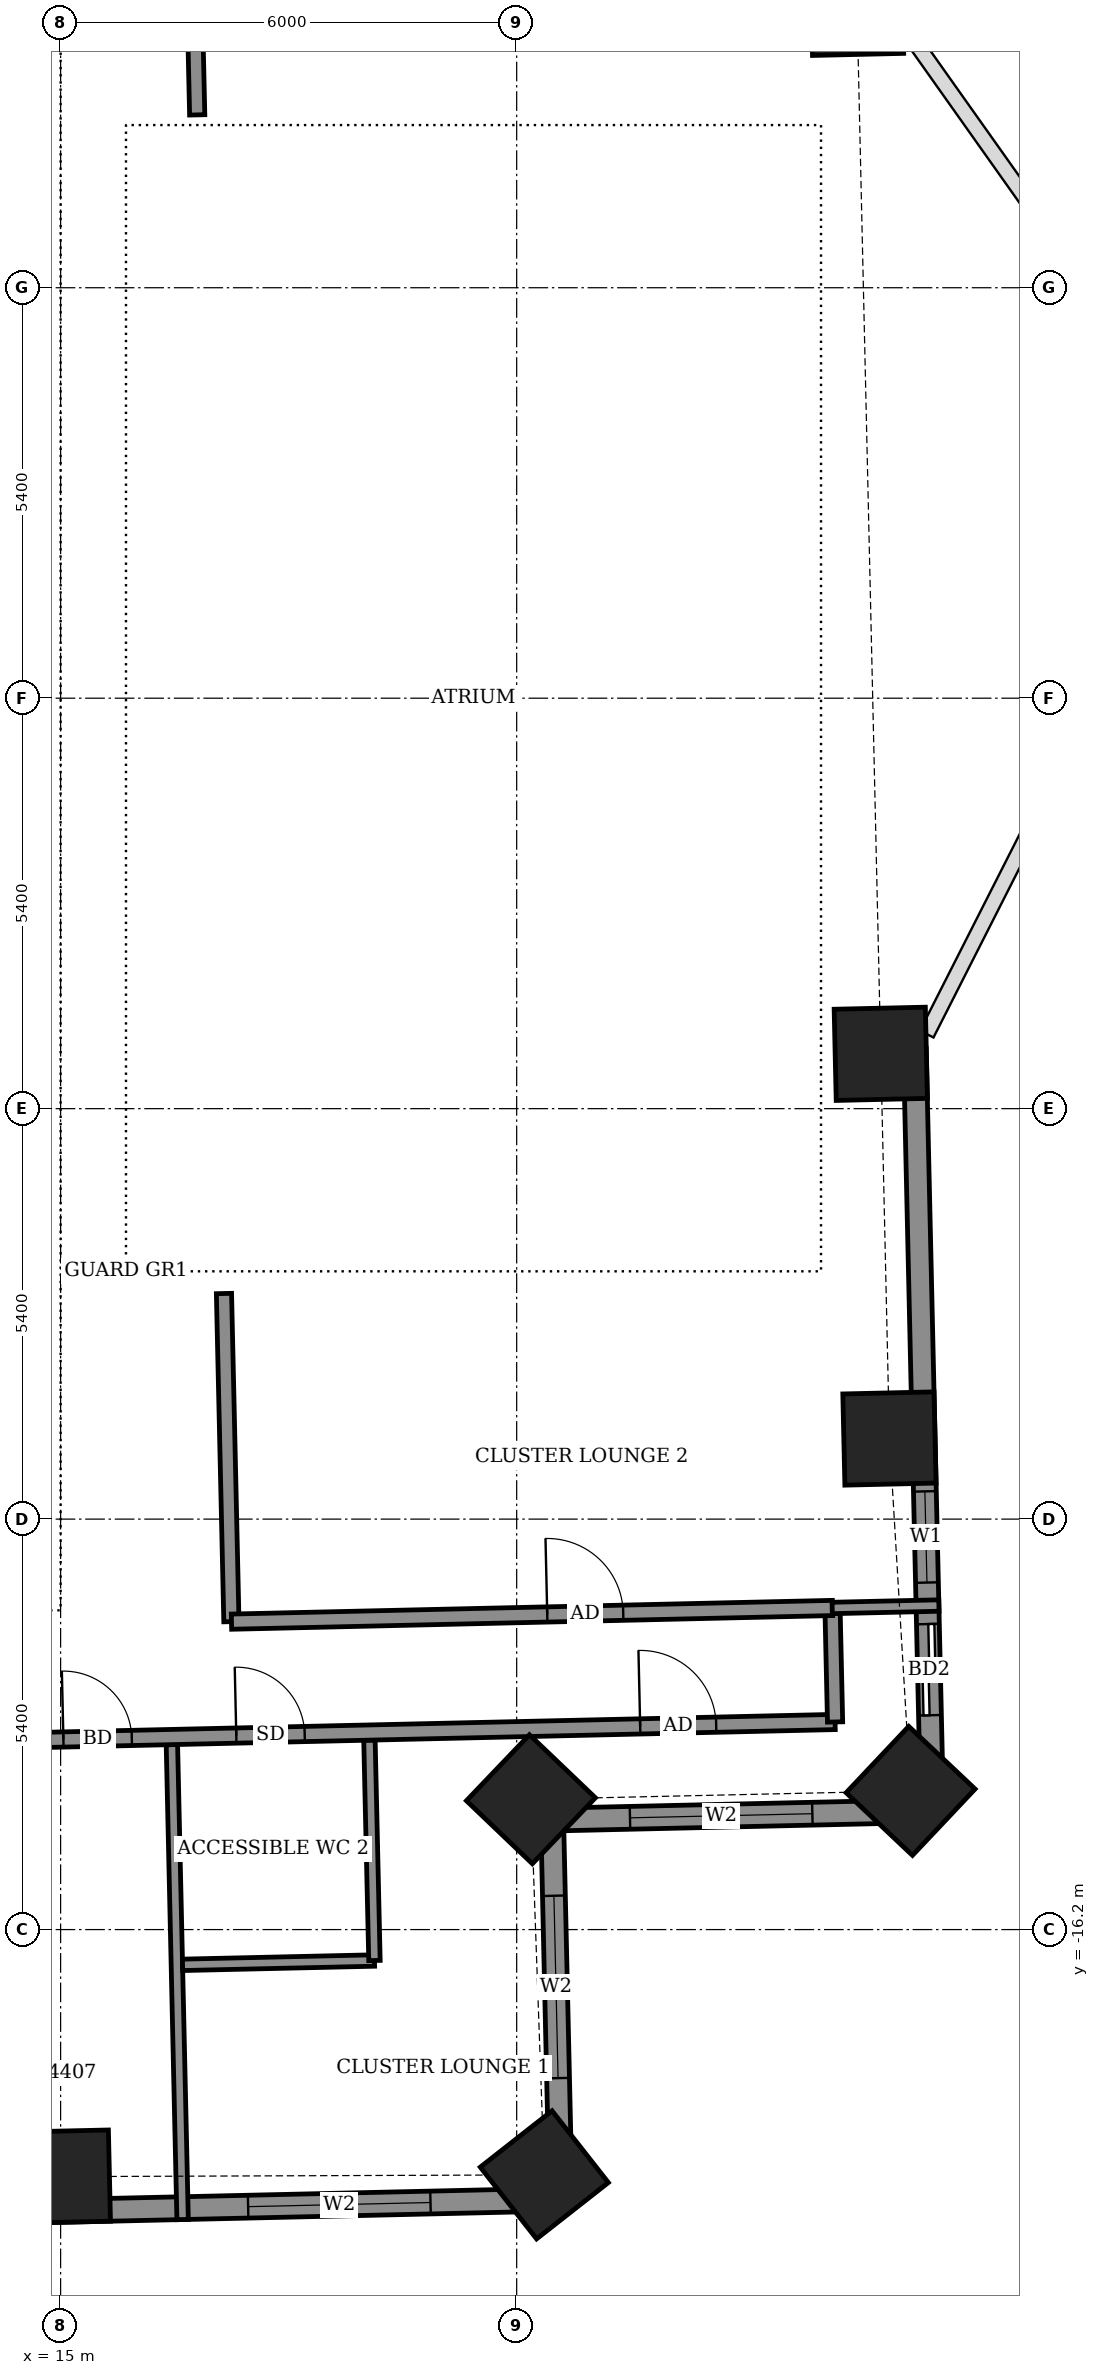
"""IFC4 building model, lengths in metres.
Left out: names, types, materials, properties, quantities, classifications, styles, units other than length and angle.
Written with IfcOpenShell. Run it as: python <this file> out.ifc"""

import sys

from ifc_helpers import new_model, si_unit, direction, frame, frame_2d, origin, origin_2d, place, context, subcontext, project, spatial, rectangle, extrude, element, fill, save


model = new_model("IFC4")
c1 = context("Model", 3, precision=1e-05, world=origin(), true_north=direction((0.0, 1.0)))
c2 = subcontext(c1, "Body", "Model", "MODEL_VIEW")
j1 = project(units=[si_unit("LENGTHUNIT", "METRE"), si_unit("PLANEANGLEUNIT", "RADIAN")], contexts=[c1])
p1 = place(None, origin())
s1 = spatial("IfcSite", under=j1, at=p1, CompositionType="ELEMENT")
p2 = place(p1, origin())
s2 = spatial("IfcBuilding", under=s1, at=p2, CompositionType="ELEMENT")
p3 = place(p2, frame((0.0, 0.0, 175.3)))
s3 = spatial("IfcBuildingStorey", under=s2, at=p3, CompositionType="ELEMENT", Elevation=175.3)
for number, where, z_axis, x_axis in (
    (1, (15.042, -19.45, -0.55), (0.0, 0.0, 1.0), (1.0, 0.023, 0.0)),
    (2, (21.364, -19.427, -0.55), (0.0, 0.0, 1.0), (0.787, 0.617, 0.0)),
    (3, (21.187, -14.486, -0.55), (0.0, 0.0, 1.0), (0.691, 0.723, 0.0)),
    (4, (26.183, -14.375, -0.55), (0.0, 0.0, 1.0), (0.686, 0.727, 0.0)),
    (5, (25.904, -9.74, -0.55), (0.0, 0.0, 1.0), (-0.023, 1.0, 0.0)),
    (6, (25.79, -4.678, -0.55), (0.0, 0.0, 1.0), (-0.023, 1.0, 0.0)),
    (7, (25.478, 9.069, -0.55), (0.0, 0.0, 1.0), (-0.023, 1.0, 0.0)),
):
    element("IfcColumn", number, at=place(p3, frame(where, z_axis=z_axis, x_axis=x_axis)), inside=s3, PredefinedType="COLUMN", context=c2, shape_type="SweptSolid", body=[
        extrude(rectangle(XDim=1.2, YDim=1.2, at=origin_2d()), origin(), (0.0, 0.0, 1.0), 3.6),
    ])
p4 = place(p3, frame((26.466, -14.64, 0.0), z_axis=(0.0, 0.0, 1.0), x_axis=(-0.022735782058, 0.999741508698, 0.0)))
e8 = element("IfcWall", 8, at=p4, inside=s3, PredefinedType="SOLIDWALL", context=c2, shape_type="SweptSolid", body=[
    extrude(rectangle(XDim=10.03, YDim=0.3, at=frame_2d((5.015, 0.0))), origin(), (0.0, 0.0, 1.0), 2.55),
])
p5 = place(p4, frame((1.26, 0.0, 0.0)))
e9 = element("IfcOpeningElement", 9, at=p5, cuts=e8, PredefinedType="OPENING", context=c2, shape_type="SweptSolid", body=[
    extrude(rectangle(XDim=1.2, YDim=2.4, at=frame_2d((0.6, 1.2))), frame((0.0, 0.16, 0.0), z_axis=(0.0, -1.0, 0.0), x_axis=(1.0, 0.0, 0.0)), (0.0, 0.0, 1.0), 0.32),
])
p6 = place(p4, frame((3.006, 0.0, 0.9)))
e10 = element("IfcOpeningElement", 10, at=p6, cuts=e8, PredefinedType="OPENING", context=c2, shape_type="SweptSolid", body=[
    extrude(rectangle(XDim=1.2, YDim=1.5, at=frame_2d((0.6, 0.75))), frame((0.0, 0.16, 0.0), z_axis=(0.0, -1.0, 0.0), x_axis=(1.0, 0.0, 0.0)), (0.0, 0.0, 1.0), 0.32),
])
p7 = place(p3, frame((-18.189, -20.655, 0.0), z_axis=(0.0, 0.0, 1.0), x_axis=(0.999742285265, 0.022701609063, 0.0)))
e11 = element("IfcWall", 11, at=p7, inside=s3, PredefinedType="SOLIDWALL", context=c2, shape_type="SweptSolid", body=[
    extrude(rectangle(XDim=39.78, YDim=0.3, at=frame_2d((19.89, 0.0))), origin(), (0.0, 0.0, 1.0), 3.05),
])
p8 = place(p7, frame((1.973, 0.0, 0.0)))
e12 = element("IfcOpeningElement", 12, at=p8, cuts=e11, PredefinedType="OPENING", context=c2, shape_type="SweptSolid", body=[
    extrude(rectangle(XDim=1.5, YDim=2.4, at=frame_2d((0.75, 1.2))), frame((0.0, 0.16, 0.0), z_axis=(0.0, -1.0, 0.0), x_axis=(1.0, 0.0, 0.0)), (0.0, 0.0, 1.0), 0.32),
])
p9 = place(p7, frame((7.24, 0.0, 0.0)))
e13 = element("IfcOpeningElement", 13, at=p9, cuts=e11, PredefinedType="OPENING", context=c2, shape_type="SweptSolid", body=[
    extrude(rectangle(XDim=1.5, YDim=2.4, at=frame_2d((0.75, 1.2))), frame((0.0, 0.16, 0.0), z_axis=(0.0, -1.0, 0.0), x_axis=(1.0, 0.0, 0.0)), (0.0, 0.0, 1.0), 0.32),
])
p10 = place(p7, frame((10.23, 0.0, 0.0)))
e14 = element("IfcOpeningElement", 14, at=p10, cuts=e11, PredefinedType="OPENING", context=c2, shape_type="SweptSolid", body=[
    extrude(rectangle(XDim=1.5, YDim=2.4, at=frame_2d((0.75, 1.2))), frame((0.0, 0.16, 0.0), z_axis=(0.0, -1.0, 0.0), x_axis=(1.0, 0.0, 0.0)), (0.0, 0.0, 1.0), 0.32),
])
p11 = place(p7, frame((14.83, 0.0, 0.0)))
e15 = element("IfcOpeningElement", 15, at=p11, cuts=e11, PredefinedType="OPENING", context=c2, shape_type="SweptSolid", body=[
    extrude(rectangle(XDim=1.5, YDim=2.4, at=frame_2d((0.75, 1.2))), frame((0.0, 0.16, 0.0), z_axis=(0.0, -1.0, 0.0), x_axis=(1.0, 0.0, 0.0)), (0.0, 0.0, 1.0), 0.32),
])
p12 = place(p7, frame((17.97, 0.0, 0.0)))
e16 = element("IfcOpeningElement", 16, at=p12, cuts=e11, PredefinedType="OPENING", context=c2, shape_type="SweptSolid", body=[
    extrude(rectangle(XDim=1.2, YDim=2.4, at=frame_2d((0.6, 1.2))), frame((0.0, 0.16, 0.0), z_axis=(0.0, -1.0, 0.0), x_axis=(1.0, 0.0, 0.0)), (0.0, 0.0, 1.0), 0.32),
])
p13 = place(p7, frame((23.275, 0.0, 0.0)))
e17 = element("IfcOpeningElement", 17, at=p13, cuts=e11, PredefinedType="OPENING", context=c2, shape_type="SweptSolid", body=[
    extrude(rectangle(XDim=1.5, YDim=2.4, at=frame_2d((0.75, 1.2))), frame((0.0, 0.16, 0.0), z_axis=(0.0, -1.0, 0.0), x_axis=(1.0, 0.0, 0.0)), (0.0, 0.0, 1.0), 0.32),
])
p14 = place(p7, frame((27.935, 0.0, 0.0)))
e18 = element("IfcOpeningElement", 18, at=p14, cuts=e11, PredefinedType="OPENING", context=c2, shape_type="SweptSolid", body=[
    extrude(rectangle(XDim=1.5, YDim=2.4, at=frame_2d((0.75, 1.2))), frame((0.0, 0.16, 0.0), z_axis=(0.0, -1.0, 0.0), x_axis=(1.0, 0.0, 0.0)), (0.0, 0.0, 1.0), 0.32),
])
p15 = place(p7, frame((30.925, 0.0, 0.0)))
e19 = element("IfcOpeningElement", 19, at=p15, cuts=e11, PredefinedType="OPENING", context=c2, shape_type="SweptSolid", body=[
    extrude(rectangle(XDim=1.5, YDim=2.4, at=frame_2d((0.75, 1.2))), frame((0.0, 0.16, 0.0), z_axis=(0.0, -1.0, 0.0), x_axis=(1.0, 0.0, 0.0)), (0.0, 0.0, 1.0), 0.32),
])
p16 = place(p7, frame((35.665, 0.0, 0.9)))
e20 = element("IfcOpeningElement", 20, at=p16, cuts=e11, PredefinedType="OPENING", context=c2, shape_type="SweptSolid", body=[
    extrude(rectangle(XDim=2.4, YDim=1.5, at=frame_2d((1.2, 0.75))), frame((0.0, 0.16, 0.0), z_axis=(0.0, -1.0, 0.0), x_axis=(1.0, 0.0, 0.0)), (0.0, 0.0, 1.0), 0.32),
])
p17 = place(p3, frame((21.581, -19.752, 0.0), z_axis=(0.0, 0.0, 1.0), x_axis=(-0.022801259434, 0.999740017489, 0.0)))
e21 = element("IfcWall", 21, at=p17, inside=s3, PredefinedType="SOLIDWALL", context=c2, shape_type="SweptSolid", body=[
    extrude(rectangle(XDim=5.0, YDim=0.3, at=frame_2d((2.5, 0.0))), origin(), (0.0, 0.0, 1.0), 2.55),
])
p18 = place(p17, frame((1.598, 0.0, 0.9)))
e22 = element("IfcOpeningElement", 22, at=p18, cuts=e21, PredefinedType="OPENING", context=c2, shape_type="SweptSolid", body=[
    extrude(rectangle(XDim=2.4, YDim=1.5, at=frame_2d((1.2, 0.75))), frame((0.0, 0.16, 0.0), z_axis=(0.0, -1.0, 0.0), x_axis=(1.0, 0.0, 0.0)), (0.0, 0.0, 1.0), 0.32),
])
p19 = place(p3, frame((21.467, -14.753, 0.0), z_axis=(0.0, 0.0, 1.0), x_axis=(0.999744450377, 0.022606059803, 0.0)))
e23 = element("IfcWall", 23, at=p19, inside=s3, PredefinedType="SOLIDWALL", context=c2, shape_type="SweptSolid", body=[
    extrude(rectangle(XDim=5.0, YDim=0.3, at=frame_2d((2.5, 0.0))), origin(), (0.0, 0.0, 1.0), 2.55),
])
p20 = place(p19, frame((1.024, 0.0, 0.9)))
e24 = element("IfcOpeningElement", 24, at=p20, cuts=e23, PredefinedType="OPENING", context=c2, shape_type="SweptSolid", body=[
    extrude(rectangle(XDim=2.4, YDim=1.5, at=frame_2d((1.2, 0.75))), frame((0.0, 0.16, 0.0), z_axis=(0.0, -1.0, 0.0), x_axis=(1.0, 0.0, 0.0)), (0.0, 0.0, 1.0), 0.32),
])
p21 = place(p3, frame((16.605, -20.015, 0.0), z_axis=(0.0, 0.0, 1.0), x_axis=(-0.022541260291, 0.999745913512, 0.0)))
e25 = element("IfcWall", 25, at=p21, inside=s3, PredefinedType="PARTITIONING", context=c2, shape_type="SweptSolid", body=[
    extrude(rectangle(XDim=6.25, YDim=0.15, at=frame_2d((3.125, 0.0))), origin(), (0.0, 0.0, 1.0), 2.55),
])
p22 = place(p3, frame((16.604, -16.664, 0.0), z_axis=(0.0, 0.0, 1.0), x_axis=(0.999744126128, 0.022620395041, 0.0)))
e26 = element("IfcWall", 26, at=p22, inside=s3, PredefinedType="PARTITIONING", context=c2, shape_type="SweptSolid", body=[
    extrude(rectangle(XDim=2.526, YDim=0.15, at=frame_2d((1.263, 0.0))), origin(), (0.0, 0.0, 1.0), 3.05),
])
p23 = place(p3, frame((19.129, -16.607, 0.0), z_axis=(0.0, 0.0, 1.0), x_axis=(-0.022732880677, 0.999741574676, 0.0)))
e27 = element("IfcWall", 27, at=p23, inside=s3, PredefinedType="PARTITIONING", context=c2, shape_type="SweptSolid", body=[
    extrude(rectangle(XDim=2.9, YDim=0.15, at=frame_2d((1.45, 0.0))), origin(), (0.0, 0.0, 1.0), 3.05),
])
p24 = place(p3, frame((-21.279, -14.523, 0.0), z_axis=(0.0, 0.0, 1.0), x_axis=(0.999742878501, 0.022675468818, 0.0)))
e28 = element("IfcWall", 28, at=p24, inside=s3, PredefinedType="PARTITIONING", context=c2, shape_type="SweptSolid", body=[
    extrude(rectangle(XDim=46.48, YDim=0.2, at=frame_2d((23.24, 0.0))), origin(), (0.0, 0.0, 1.0), 3.05),
])
p25 = place(p24, frame((1.325, 0.0, 0.0)))
e29 = element("IfcOpeningElement", 29, at=p25, cuts=e28, PredefinedType="OPENING", context=c2, shape_type="SweptSolid", body=[
    extrude(rectangle(XDim=1.0, YDim=2.1, at=frame_2d((0.5, 1.05))), frame((0.0, 0.11, 0.0), z_axis=(0.0, -1.0, 0.0), x_axis=(1.0, 0.0, 0.0)), (0.0, 0.0, 1.0), 0.22),
])
p26 = place(p24, frame((5.9, 0.0, 0.0)))
e30 = element("IfcOpeningElement", 30, at=p26, cuts=e28, PredefinedType="OPENING", context=c2, shape_type="SweptSolid", body=[
    extrude(rectangle(XDim=0.9, YDim=2.1, at=frame_2d((0.45, 1.05))), frame((0.0, 0.11, 0.0), z_axis=(0.0, -1.0, 0.0), x_axis=(1.0, 0.0, 0.0)), (0.0, 0.0, 1.0), 0.22),
])
p27 = place(p24, frame((10.6, 0.0, 0.0)))
e31 = element("IfcOpeningElement", 31, at=p27, cuts=e28, PredefinedType="OPENING", context=c2, shape_type="SweptSolid", body=[
    extrude(rectangle(XDim=0.9, YDim=2.1, at=frame_2d((0.45, 1.05))), frame((0.0, 0.11, 0.0), z_axis=(0.0, -1.0, 0.0), x_axis=(1.0, 0.0, 0.0)), (0.0, 0.0, 1.0), 0.22),
])
p28 = place(p24, frame((12.525, 0.0, 0.0)))
e32 = element("IfcOpeningElement", 32, at=p28, cuts=e28, PredefinedType="OPENING", context=c2, shape_type="SweptSolid", body=[
    extrude(rectangle(XDim=0.9, YDim=2.1, at=frame_2d((0.45, 1.05))), frame((0.0, 0.11, 0.0), z_axis=(0.0, -1.0, 0.0), x_axis=(1.0, 0.0, 0.0)), (0.0, 0.0, 1.0), 0.22),
])
p29 = place(p24, frame((19.175, 0.0, 0.0)))
e33 = element("IfcOpeningElement", 33, at=p29, cuts=e28, PredefinedType="OPENING", context=c2, shape_type="SweptSolid", body=[
    extrude(rectangle(XDim=0.9, YDim=2.1, at=frame_2d((0.45, 1.05))), frame((0.0, 0.11, 0.0), z_axis=(0.0, -1.0, 0.0), x_axis=(1.0, 0.0, 0.0)), (0.0, 0.0, 1.0), 0.22),
])
p30 = place(p24, frame((21.05, 0.0, 0.0)))
e34 = element("IfcOpeningElement", 34, at=p30, cuts=e28, PredefinedType="OPENING", context=c2, shape_type="SweptSolid", body=[
    extrude(rectangle(XDim=0.9, YDim=2.1, at=frame_2d((0.45, 1.05))), frame((0.0, 0.11, 0.0), z_axis=(0.0, -1.0, 0.0), x_axis=(1.0, 0.0, 0.0)), (0.0, 0.0, 1.0), 0.22),
])
p31 = place(p24, frame((27.725, 0.0, 0.0)))
e35 = element("IfcOpeningElement", 35, at=p31, cuts=e28, PredefinedType="OPENING", context=c2, shape_type="SweptSolid", body=[
    extrude(rectangle(XDim=0.9, YDim=2.1, at=frame_2d((0.45, 1.05))), frame((0.0, 0.11, 0.0), z_axis=(0.0, -1.0, 0.0), x_axis=(1.0, 0.0, 0.0)), (0.0, 0.0, 1.0), 0.22),
])
p32 = place(p24, frame((29.6, 0.0, 0.0)))
e36 = element("IfcOpeningElement", 36, at=p32, cuts=e28, PredefinedType="OPENING", context=c2, shape_type="SweptSolid", body=[
    extrude(rectangle(XDim=0.9, YDim=2.1, at=frame_2d((0.45, 1.05))), frame((0.0, 0.11, 0.0), z_axis=(0.0, -1.0, 0.0), x_axis=(1.0, 0.0, 0.0)), (0.0, 0.0, 1.0), 0.22),
])
p33 = place(p24, frame((36.325, 0.0, 0.0)))
e37 = element("IfcOpeningElement", 37, at=p33, cuts=e28, PredefinedType="OPENING", context=c2, shape_type="SweptSolid", body=[
    extrude(rectangle(XDim=0.9, YDim=2.1, at=frame_2d((0.45, 1.05))), frame((0.0, 0.11, 0.0), z_axis=(0.0, -1.0, 0.0), x_axis=(1.0, 0.0, 0.0)), (0.0, 0.0, 1.0), 0.22),
])
p34 = place(p24, frame((43.915, 0.0, 0.0)))
e38 = element("IfcOpeningElement", 38, at=p34, cuts=e28, PredefinedType="OPENING", context=c2, shape_type="SweptSolid", body=[
    extrude(rectangle(XDim=1.0, YDim=2.1, at=frame_2d((0.5, 1.05))), frame((0.0, 0.11, 0.0), z_axis=(0.0, -1.0, 0.0), x_axis=(1.0, 0.0, 0.0)), (0.0, 0.0, 1.0), 0.22),
])
p35 = place(p24, frame((38.6, 0.0, 0.0)))
e39 = element("IfcOpeningElement", 39, at=p35, cuts=e28, PredefinedType="OPENING", context=c2, shape_type="SweptSolid", body=[
    extrude(rectangle(XDim=0.9, YDim=2.1, at=frame_2d((0.45, 1.05))), frame((0.0, 0.11, 0.0), z_axis=(0.0, -1.0, 0.0), x_axis=(1.0, 0.0, 0.0)), (0.0, 0.0, 1.0), 0.22),
])
p36 = place(p3, frame((25.189, -13.469, 0.0), z_axis=(0.0, 0.0, 1.0), x_axis=(-0.022617910375, 0.999744182344, 0.0)))
e40 = element("IfcWall", 40, at=p36, inside=s3, PredefinedType="PARTITIONING", context=c2, shape_type="SweptSolid", body=[
    extrude(rectangle(XDim=1.5, YDim=0.2, at=frame_2d((0.75, 0.0))), origin(), (0.0, 0.0, 1.0), 3.05),
])
p37 = place(p3, frame((17.247, -12.149, 0.0), z_axis=(0.0, 0.0, 1.0), x_axis=(-0.022729111383, 0.999741660378, 0.0)))
e41 = element("IfcWall", 41, at=p37, inside=s3, PredefinedType="PARTITIONING", context=c2, shape_type="SweptSolid", body=[
    extrude(rectangle(XDim=4.318, YDim=0.2, at=frame_2d((2.159, 0.0))), origin(), (0.0, 0.0, 1.0), 3.05),
])
p38 = place(p3, frame((17.248, -12.149, 0.0), z_axis=(0.0, 0.0, 1.0), x_axis=(0.999741181744, 0.022750154412, 0.0)))
e42 = element("IfcWall", 42, at=p38, inside=s3, PredefinedType="PARTITIONING", context=c2, shape_type="SweptSolid", body=[
    extrude(rectangle(XDim=7.909, YDim=0.2, at=frame_2d((3.955, 0.0))), origin(), (0.0, 0.0, 1.0), 3.05),
])
p39 = place(p38, frame((4.155, 0.0, 0.0)))
e43 = element("IfcOpeningElement", 43, at=p39, cuts=e42, PredefinedType="OPENING", context=c2, shape_type="SweptSolid", body=[
    extrude(rectangle(XDim=1.0, YDim=2.1, at=frame_2d((0.5, 1.05))), frame((0.0, 0.11, 0.0), z_axis=(0.0, -1.0, 0.0), x_axis=(1.0, 0.0, 0.0)), (0.0, 0.0, 1.0), 0.22),
])
p40 = place(p3, frame((25.151, -11.969, 0.0), z_axis=(0.0, 0.0, 1.0), x_axis=(0.999740667531, 0.022772739949, 0.0)))
e44 = element("IfcWall", 44, at=p40, inside=s3, PredefinedType="PARTITIONING", context=c2, shape_type="SweptSolid", body=[
    extrude(rectangle(XDim=1.404, YDim=0.15, at=frame_2d((0.702, 0.0))), origin(), (0.0, 0.0, 1.0), 2.55),
])
p41 = place(p3, frame((16.797, 7.674, 0.0), z_axis=(0.0, 0.0, 1.0), x_axis=(-0.022698399288, 0.999742358145, 0.0)))
e45 = element("IfcWall", 45, at=p41, inside=s3, PredefinedType="PARTITIONING", context=c2, shape_type="SweptSolid", body=[
    extrude(rectangle(XDim=8.196, YDim=0.2, at=frame_2d((4.098, 0.0))), origin(), (0.0, 0.0, 1.0), 3.05),
])
p42 = place(p41, frame((3.683, 0.0, 0.0)))
e46 = element("IfcOpeningElement", 46, at=p42, cuts=e45, PredefinedType="OPENING", context=c2, shape_type="SweptSolid", body=[
    extrude(rectangle(XDim=1.0, YDim=2.1, at=frame_2d((0.5, 1.05))), frame((0.0, 0.11, 0.0), z_axis=(0.0, -1.0, 0.0), x_axis=(1.0, 0.0, 0.0)), (0.0, 0.0, 1.0), 0.22),
])
p43 = place(p5, origin())
e47 = element("IfcDoor", 47, at=p43, inside=s3, OperationType="SLIDING_TO_LEFT", PredefinedType="DOOR", context=c2, shape_type="SweptSolid", body=[
    extrude(rectangle(XDim=1.2, YDim=2.4, at=frame_2d((0.6, 1.2))), frame((0.0, 0.025, 0.0), z_axis=(0.0, -1.0, 0.0), x_axis=(1.0, 0.0, 0.0)), (0.0, 0.0, 1.0), 0.05),
])
fill(e9, e47)
p44 = place(p6, origin())
e48 = element("IfcWindow", 48, at=p44, inside=s3, PartitioningType="SINGLE_PANEL", PredefinedType="WINDOW", context=c2, shape_type="SweptSolid", body=[
    extrude(rectangle(XDim=1.2, YDim=1.5, at=frame_2d((0.6, 0.75))), frame((0.0, 0.03, 0.0), z_axis=(0.0, -1.0, 0.0), x_axis=(1.0, 0.0, 0.0)), (0.0, 0.0, 1.0), 0.06),
])
fill(e10, e48)
p45 = place(p16, origin())
e49 = element("IfcWindow", 49, at=p45, inside=s3, PartitioningType="DOUBLE_PANEL_VERTICAL", PredefinedType="WINDOW", context=c2, shape_type="SweptSolid", body=[
    extrude(rectangle(XDim=2.4, YDim=1.5, at=frame_2d((1.2, 0.75))), frame((0.0, 0.03, 0.0), z_axis=(0.0, -1.0, 0.0), x_axis=(1.0, 0.0, 0.0)), (0.0, 0.0, 1.0), 0.06),
])
fill(e20, e49)
p46 = place(p18, origin())
e50 = element("IfcWindow", 50, at=p46, inside=s3, PartitioningType="DOUBLE_PANEL_VERTICAL", PredefinedType="WINDOW", context=c2, shape_type="SweptSolid", body=[
    extrude(rectangle(XDim=2.4, YDim=1.5, at=frame_2d((1.2, 0.75))), frame((0.0, 0.03, 0.0), z_axis=(0.0, -1.0, 0.0), x_axis=(1.0, 0.0, 0.0)), (0.0, 0.0, 1.0), 0.06),
])
fill(e22, e50)
p47 = place(p20, origin())
e51 = element("IfcWindow", 51, at=p47, inside=s3, PartitioningType="DOUBLE_PANEL_VERTICAL", PredefinedType="WINDOW", context=c2, shape_type="SweptSolid", body=[
    extrude(rectangle(XDim=2.4, YDim=1.5, at=frame_2d((1.2, 0.75))), frame((0.0, 0.03, 0.0), z_axis=(0.0, -1.0, 0.0), x_axis=(1.0, 0.0, 0.0)), (0.0, 0.0, 1.0), 0.06),
])
fill(e24, e51)
p48 = place(p33, origin())
e52 = element("IfcDoor", 52, at=p48, inside=s3, OperationType="SINGLE_SWING_LEFT", PredefinedType="DOOR", context=c2, shape_type="SweptSolid", body=[
    extrude(rectangle(XDim=0.9, YDim=2.1, at=frame_2d((0.45, 1.05))), frame((0.0, 0.025, 0.0), z_axis=(0.0, -1.0, 0.0), x_axis=(1.0, 0.0, 0.0)), (0.0, 0.0, 1.0), 0.05),
])
fill(e37, e52)
p49 = place(p34, origin())
e53 = element("IfcDoor", 53, at=p49, inside=s3, OperationType="SINGLE_SWING_RIGHT", PredefinedType="DOOR", context=c2, shape_type="SweptSolid", body=[
    extrude(rectangle(XDim=1.0, YDim=2.1, at=frame_2d((0.5, 1.05))), frame((0.0, 0.025, 0.0), z_axis=(0.0, -1.0, 0.0), x_axis=(1.0, 0.0, 0.0)), (0.0, 0.0, 1.0), 0.05),
])
fill(e38, e53)
p50 = place(p35, origin())
e54 = element("IfcDoor", 54, at=p50, inside=s3, OperationType="SINGLE_SWING_RIGHT", PredefinedType="DOOR", context=c2, shape_type="SweptSolid", body=[
    extrude(rectangle(XDim=0.9, YDim=2.1, at=frame_2d((0.45, 1.05))), frame((0.0, 0.025, 0.0), z_axis=(0.0, -1.0, 0.0), x_axis=(1.0, 0.0, 0.0)), (0.0, 0.0, 1.0), 0.05),
])
fill(e39, e54)
p51 = place(p39, origin())
e55 = element("IfcDoor", 55, at=p51, inside=s3, OperationType="SINGLE_SWING_LEFT", PredefinedType="DOOR", context=c2, shape_type="SweptSolid", body=[
    extrude(rectangle(XDim=1.0, YDim=2.1, at=frame_2d((0.5, 1.05))), frame((0.0, 0.025, 0.0), z_axis=(0.0, -1.0, 0.0), x_axis=(1.0, 0.0, 0.0)), (0.0, 0.0, 1.0), 0.05),
])
fill(e43, e55)
save(model, sys.argv[1])
